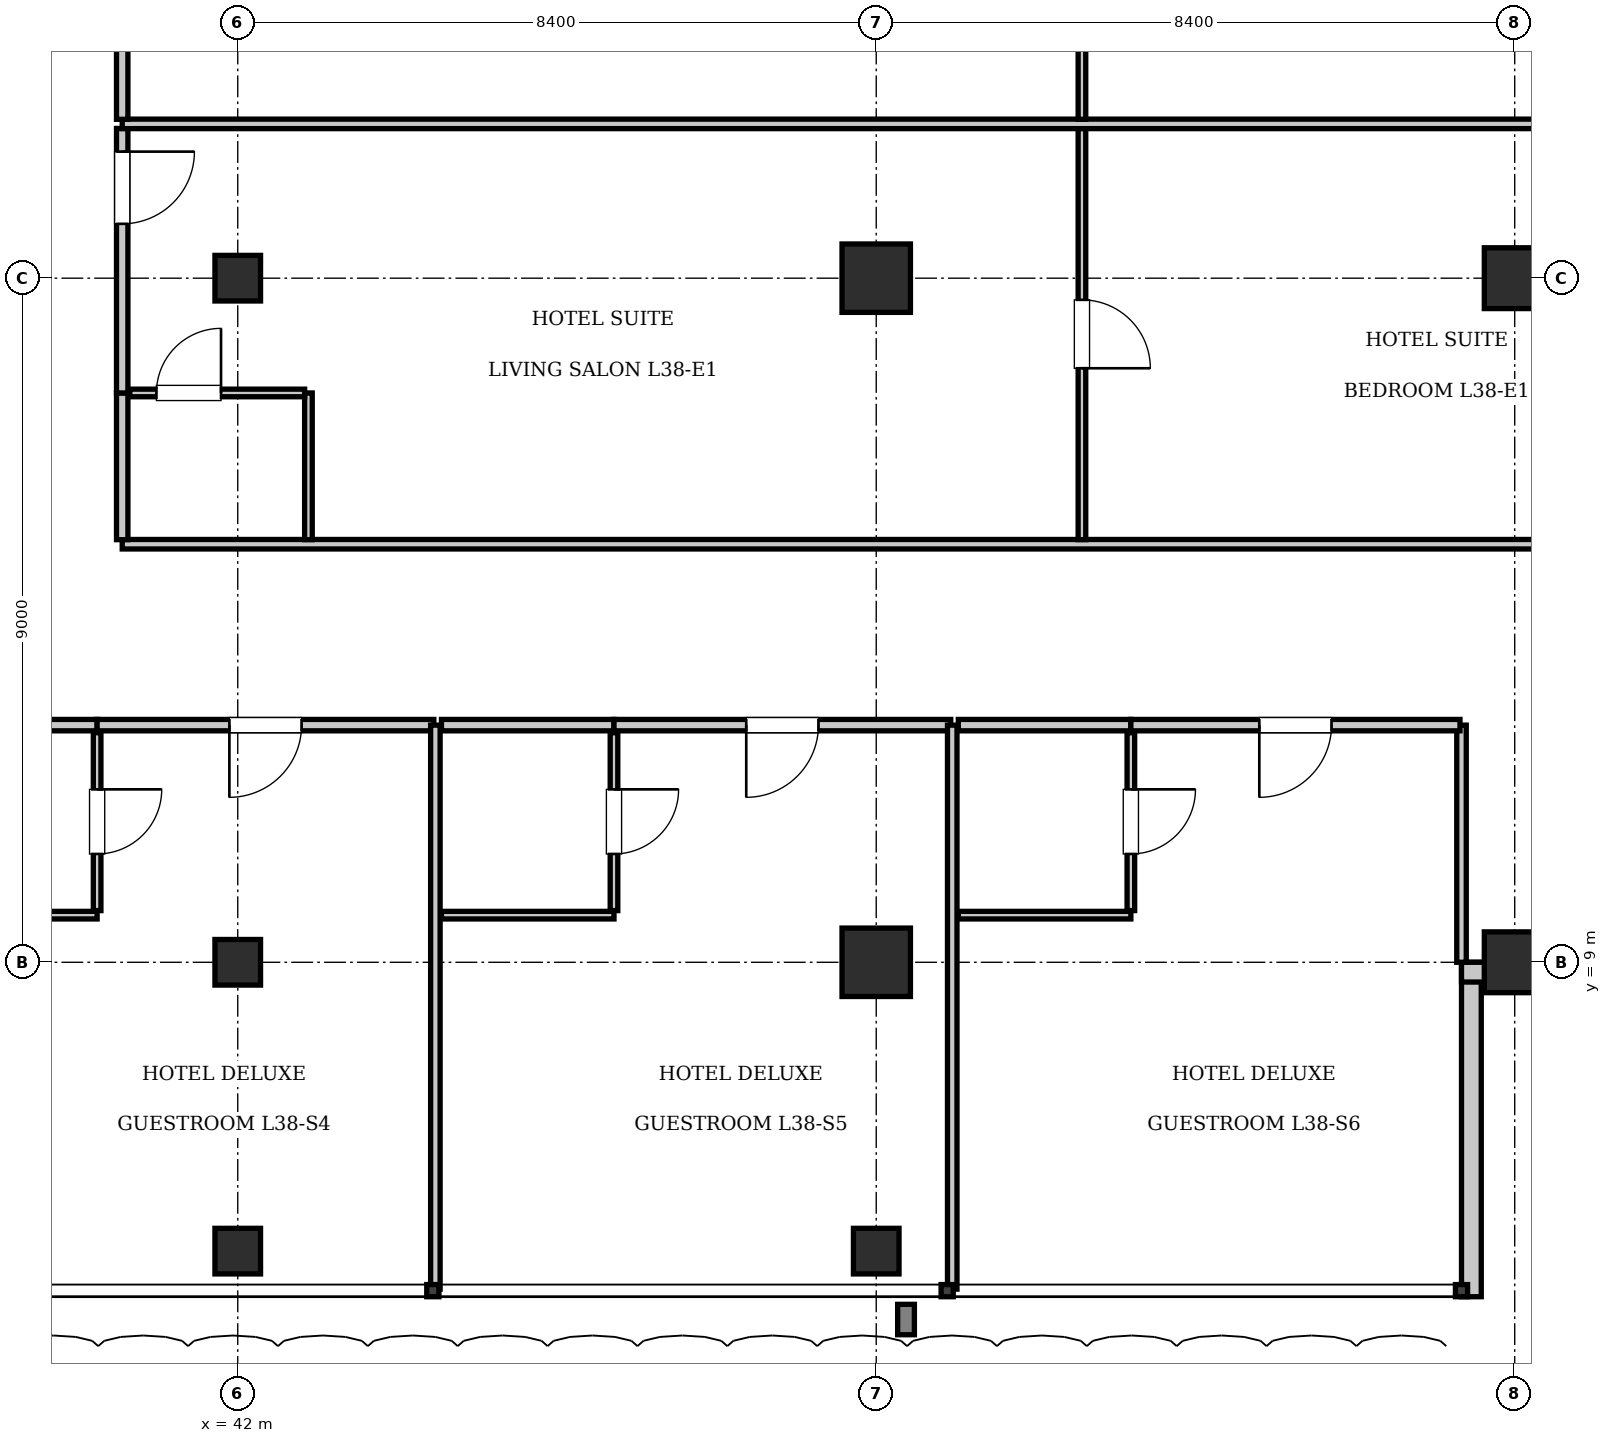
"""IFC4 building model, lengths in metres.
Left out: names, types, materials, properties, quantities, classifications, styles, units other than length and angle.
Written with IfcOpenShell. Run it as: python <this file> out.ifc"""

import sys

from ifc_helpers import new_model, si_unit, direction, frame, frame_2d, origin, origin_2d, place, context, subcontext, project, spatial, rectangle, i_section, extrude, element, fill, save


model = new_model("IFC4")
c1 = context("Model", 3, precision=1e-05, world=origin(), true_north=direction((0.0, 1.0)))
c2 = subcontext(c1, "Body", "Model", "MODEL_VIEW")
j1 = project(units=[si_unit("LENGTHUNIT", "METRE"), si_unit("PLANEANGLEUNIT", "RADIAN")], contexts=[c1])
p1 = place(None, origin())
s1 = spatial("IfcSite", under=j1, at=p1, CompositionType="ELEMENT")
p2 = place(p1, origin())
s2 = spatial("IfcBuilding", under=s1, at=p2, CompositionType="ELEMENT")
p3 = place(p2, frame((0.0, 0.0, 158.2)))
s3 = spatial("IfcBuildingStorey", under=s2, at=p3, CompositionType="ELEMENT", Elevation=158.2)
for number, where, z_axis, x_axis in (
    (1, (50.4, 18.0, 0.0), (0.0, 0.0, 1.0), (1.0, 0.0, 0.0)),
    (2, (50.4, 9.0, 0.0), (0.0, 0.0, 1.0), (1.0, 0.0, 0.0)),
):
    element("IfcColumn", number, at=place(p3, frame(where, z_axis=z_axis, x_axis=x_axis)), inside=s3, PredefinedType="COLUMN", context=c2, shape_type="SweptSolid", body=[
        extrude(rectangle(XDim=0.9, YDim=0.9, at=origin_2d()), origin(), (0.0, 0.0, 1.0), 3.85),
    ])
for number, where, z_axis, x_axis in (
    (3, (42.0, 9.0, 0.0), (0.0, 0.0, 1.0), (1.0, 0.0, 0.0)),
    (4, (42.0, 18.0, 0.0), (0.0, 0.0, 1.0), (1.0, 0.0, 0.0)),
):
    element("IfcColumn", number, at=place(p3, frame(where, z_axis=z_axis, x_axis=x_axis)), inside=s3, PredefinedType="COLUMN", context=c2, shape_type="SweptSolid", body=[
        extrude(i_section(OverallWidth=0.6, OverallDepth=0.6, WebThickness=0.025, FlangeThickness=0.038, at=origin_2d()), origin(), (0.0, 0.0, 1.0), 3.85),
    ])
for number, where, z_axis, x_axis in (
    (5, (58.8, 9.0, 0.0), (0.0, 0.0, 1.0), (1.0, 0.0, 0.0)),
    (6, (58.8, 18.0, 0.0), (0.0, 0.0, 1.0), (1.0, 0.0, 0.0)),
):
    element("IfcColumn", number, at=place(p3, frame(where, z_axis=z_axis, x_axis=x_axis)), inside=s3, PredefinedType="COLUMN", context=c2, shape_type="SweptSolid", body=[
        extrude(rectangle(XDim=0.8, YDim=0.8, at=origin_2d()), origin(), (0.0, 0.0, 1.0), 3.85),
    ])
for number, where, z_axis, x_axis in (
    (7, (42.0, 5.2, 0.0), (0.0, 0.0, 1.0), (1.0, 0.0, 0.0)),
    (8, (50.4, 5.2, 0.0), (0.0, 0.0, 1.0), (1.0, 0.0, 0.0)),
):
    element("IfcColumn", number, at=place(p3, frame(where, z_axis=z_axis, x_axis=x_axis)), inside=s3, PredefinedType="COLUMN", context=c2, shape_type="SweptSolid", body=[
        extrude(i_section(OverallWidth=0.6, OverallDepth=0.6, WebThickness=0.025, FlangeThickness=0.038, at=origin_2d()), origin(), (0.0, 0.0, 1.0), 3.85),
    ])
p4 = place(p3, frame((58.23, 9.0, 0.0), z_axis=(0.0, 0.0, 1.0), x_axis=(0.0, -1.0, 0.0)))
e9 = element("IfcWall", 9, at=p4, inside=s3, PredefinedType="SOLIDWALL", context=c2, shape_type="SweptSolid", body=[
    extrude(rectangle(XDim=4.4, YDim=0.26, at=frame_2d((2.2, 0.0))), origin(), (0.0, 0.0, 1.0), 3.61),
])
p5 = place(p3, frame((62.5, 8.87, 0.0), z_axis=(0.0, 0.0, 1.0), x_axis=(-1.0, 0.0, 0.0)))
e10 = element("IfcWall", 10, at=p5, inside=s3, PredefinedType="SOLIDWALL", context=c2, shape_type="SweptSolid", body=[
    extrude(rectangle(XDim=4.4, YDim=0.26, at=frame_2d((2.2, 0.0))), origin(), (0.0, 0.0, 1.0), 3.007),
])
p6 = place(p3, frame((58.1, 9.0, 0.0), z_axis=(0.0, 0.0, 1.0), x_axis=(0.0, 1.0, 0.0)))
e11 = element("IfcWall", 11, at=p6, inside=s3, PredefinedType="PARTITIONING", context=c2, shape_type="SweptSolid", body=[
    extrude(rectangle(XDim=3.12, YDim=0.125, at=frame_2d((1.56, 0.0))), origin(), (0.0, 0.0, 1.0), 3.61),
])
p7 = place(p3, frame((37.88, 12.12, 0.0), z_axis=(0.0, 0.0, 1.0), x_axis=(1.0, 0.0, 0.0)))
e12 = element("IfcWall", 12, at=p7, inside=s3, PredefinedType="PARTITIONING", context=c2, shape_type="SweptSolid", body=[
    extrude(rectangle(XDim=2.27, YDim=0.15, at=frame_2d((1.135, 0.0))), origin(), (0.0, 0.0, 1.0), 3.61),
])
p8 = place(p3, frame((37.88, 9.62, 0.0), z_axis=(0.0, 0.0, 1.0), x_axis=(1.0, 0.0, 0.0)))
e13 = element("IfcWall", 13, at=p8, inside=s3, PredefinedType="PARTITIONING", context=c2, shape_type="SweptSolid", body=[
    extrude(rectangle(XDim=2.27, YDim=0.1, at=frame_2d((1.135, 0.0))), origin(), (0.0, 0.0, 1.0), 3.61),
])
p9 = place(p3, frame((40.15, 9.68, 0.0), z_axis=(0.0, 0.0, 1.0), x_axis=(0.0, 1.0, 0.0)))
e14 = element("IfcWall", 14, at=p9, inside=s3, PredefinedType="PARTITIONING", context=c2, shape_type="SweptSolid", body=[
    extrude(rectangle(XDim=2.34, YDim=0.1, at=frame_2d((1.17, 0.0))), origin(), (0.0, 0.0, 1.0), 3.61),
])
p10 = place(p9, frame((0.745, 0.0, 0.0)))
e15 = element("IfcOpeningElement", 15, at=p10, cuts=e14, PredefinedType="OPENING", context=c2, shape_type="SweptSolid", body=[
    extrude(rectangle(XDim=0.85, YDim=2.1, at=frame_2d((0.425, 1.05))), frame((0.0, 0.06, 0.0), z_axis=(0.0, -1.0, 0.0), x_axis=(1.0, 0.0, 0.0)), (0.0, 0.0, 1.0), 0.12),
])
p11 = place(p3, frame((40.15, 12.12, 0.0), z_axis=(0.0, 0.0, 1.0), x_axis=(1.0, 0.0, 0.0)))
e16 = element("IfcWall", 16, at=p11, inside=s3, PredefinedType="PARTITIONING", context=c2, shape_type="SweptSolid", body=[
    extrude(rectangle(XDim=4.43, YDim=0.15, at=frame_2d((2.215, 0.0))), origin(), (0.0, 0.0, 1.0), 3.61),
])
p12 = place(p11, frame((1.74, 0.0, 0.0)))
e17 = element("IfcOpeningElement", 17, at=p12, cuts=e16, PredefinedType="OPENING", context=c2, shape_type="SweptSolid", body=[
    extrude(rectangle(XDim=0.95, YDim=2.15, at=frame_2d((0.475, 1.075))), frame((0.0, 0.085, 0.0), z_axis=(0.0, -1.0, 0.0), x_axis=(1.0, 0.0, 0.0)), (0.0, 0.0, 1.0), 0.17),
])
p13 = place(p3, frame((44.6, 4.7, 0.0), z_axis=(0.0, 0.0, 1.0), x_axis=(0.0, 1.0, 0.0)))
e18 = element("IfcWall", 18, at=p13, inside=s3, PredefinedType="PARTITIONING", context=c2, shape_type="SweptSolid", body=[
    extrude(rectangle(XDim=7.42, YDim=0.125, at=frame_2d((3.71, 0.0))), origin(), (0.0, 0.0, 1.0), 3.61),
])
p14 = place(p3, frame((44.68, 12.12, 0.0), z_axis=(0.0, 0.0, 1.0), x_axis=(1.0, 0.0, 0.0)))
e19 = element("IfcWall", 19, at=p14, inside=s3, PredefinedType="PARTITIONING", context=c2, shape_type="SweptSolid", body=[
    extrude(rectangle(XDim=2.27, YDim=0.15, at=frame_2d((1.135, 0.0))), origin(), (0.0, 0.0, 1.0), 3.61),
])
p15 = place(p3, frame((44.68, 9.62, 0.0), z_axis=(0.0, 0.0, 1.0), x_axis=(1.0, 0.0, 0.0)))
e20 = element("IfcWall", 20, at=p15, inside=s3, PredefinedType="PARTITIONING", context=c2, shape_type="SweptSolid", body=[
    extrude(rectangle(XDim=2.27, YDim=0.1, at=frame_2d((1.135, 0.0))), origin(), (0.0, 0.0, 1.0), 3.61),
])
p16 = place(p3, frame((46.95, 9.68, 0.0), z_axis=(0.0, 0.0, 1.0), x_axis=(0.0, 1.0, 0.0)))
e21 = element("IfcWall", 21, at=p16, inside=s3, PredefinedType="PARTITIONING", context=c2, shape_type="SweptSolid", body=[
    extrude(rectangle(XDim=2.34, YDim=0.1, at=frame_2d((1.17, 0.0))), origin(), (0.0, 0.0, 1.0), 3.61),
])
p17 = place(p16, frame((0.745, 0.0, 0.0)))
e22 = element("IfcOpeningElement", 22, at=p17, cuts=e21, PredefinedType="OPENING", context=c2, shape_type="SweptSolid", body=[
    extrude(rectangle(XDim=0.85, YDim=2.1, at=frame_2d((0.425, 1.05))), frame((0.0, 0.06, 0.0), z_axis=(0.0, -1.0, 0.0), x_axis=(1.0, 0.0, 0.0)), (0.0, 0.0, 1.0), 0.12),
])
p18 = place(p3, frame((46.95, 12.12, 0.0), z_axis=(0.0, 0.0, 1.0), x_axis=(1.0, 0.0, 0.0)))
e23 = element("IfcWall", 23, at=p18, inside=s3, PredefinedType="PARTITIONING", context=c2, shape_type="SweptSolid", body=[
    extrude(rectangle(XDim=4.43, YDim=0.15, at=frame_2d((2.215, 0.0))), origin(), (0.0, 0.0, 1.0), 3.61),
])
p19 = place(p18, frame((1.74, 0.0, 0.0)))
e24 = element("IfcOpeningElement", 24, at=p19, cuts=e23, PredefinedType="OPENING", context=c2, shape_type="SweptSolid", body=[
    extrude(rectangle(XDim=0.95, YDim=2.15, at=frame_2d((0.475, 1.075))), frame((0.0, 0.085, 0.0), z_axis=(0.0, -1.0, 0.0), x_axis=(1.0, 0.0, 0.0)), (0.0, 0.0, 1.0), 0.17),
])
p20 = place(p3, frame((51.4, 4.7, 0.0), z_axis=(0.0, 0.0, 1.0), x_axis=(0.0, 1.0, 0.0)))
e25 = element("IfcWall", 25, at=p20, inside=s3, PredefinedType="PARTITIONING", context=c2, shape_type="SweptSolid", body=[
    extrude(rectangle(XDim=7.42, YDim=0.125, at=frame_2d((3.71, 0.0))), origin(), (0.0, 0.0, 1.0), 3.61),
])
p21 = place(p3, frame((51.48, 12.12, 0.0), z_axis=(0.0, 0.0, 1.0), x_axis=(1.0, 0.0, 0.0)))
e26 = element("IfcWall", 26, at=p21, inside=s3, PredefinedType="PARTITIONING", context=c2, shape_type="SweptSolid", body=[
    extrude(rectangle(XDim=2.27, YDim=0.15, at=frame_2d((1.135, 0.0))), origin(), (0.0, 0.0, 1.0), 3.61),
])
p22 = place(p3, frame((51.48, 9.62, 0.0), z_axis=(0.0, 0.0, 1.0), x_axis=(1.0, 0.0, 0.0)))
e27 = element("IfcWall", 27, at=p22, inside=s3, PredefinedType="PARTITIONING", context=c2, shape_type="SweptSolid", body=[
    extrude(rectangle(XDim=2.27, YDim=0.1, at=frame_2d((1.135, 0.0))), origin(), (0.0, 0.0, 1.0), 3.61),
])
p23 = place(p3, frame((53.75, 9.68, 0.0), z_axis=(0.0, 0.0, 1.0), x_axis=(0.0, 1.0, 0.0)))
e28 = element("IfcWall", 28, at=p23, inside=s3, PredefinedType="PARTITIONING", context=c2, shape_type="SweptSolid", body=[
    extrude(rectangle(XDim=2.34, YDim=0.1, at=frame_2d((1.17, 0.0))), origin(), (0.0, 0.0, 1.0), 3.61),
])
p24 = place(p23, frame((0.745, 0.0, 0.0)))
e29 = element("IfcOpeningElement", 29, at=p24, cuts=e28, PredefinedType="OPENING", context=c2, shape_type="SweptSolid", body=[
    extrude(rectangle(XDim=0.85, YDim=2.1, at=frame_2d((0.425, 1.05))), frame((0.0, 0.06, 0.0), z_axis=(0.0, -1.0, 0.0), x_axis=(1.0, 0.0, 0.0)), (0.0, 0.0, 1.0), 0.12),
])
p25 = place(p3, frame((53.75, 12.12, 0.0), z_axis=(0.0, 0.0, 1.0), x_axis=(1.0, 0.0, 0.0)))
e30 = element("IfcWall", 30, at=p25, inside=s3, PredefinedType="PARTITIONING", context=c2, shape_type="SweptSolid", body=[
    extrude(rectangle(XDim=4.33, YDim=0.15, at=frame_2d((2.165, 0.0))), origin(), (0.0, 0.0, 1.0), 3.61),
])
p26 = place(p25, frame((1.69, 0.0, 0.0)))
e31 = element("IfcOpeningElement", 31, at=p26, cuts=e30, PredefinedType="OPENING", context=c2, shape_type="SweptSolid", body=[
    extrude(rectangle(XDim=0.95, YDim=2.15, at=frame_2d((0.475, 1.075))), frame((0.0, 0.085, 0.0), z_axis=(0.0, -1.0, 0.0), x_axis=(1.0, 0.0, 0.0)), (0.0, 0.0, 1.0), 0.17),
])
p27 = place(p3, frame((40.48, 14.5, 0.0), z_axis=(0.0, 0.0, 1.0), x_axis=(1.0, 0.0, 0.0)))
e32 = element("IfcWall", 32, at=p27, inside=s3, PredefinedType="PARTITIONING", context=c2, shape_type="SweptSolid", body=[
    extrude(rectangle(XDim=21.92, YDim=0.125, at=frame_2d((10.96, 0.0))), origin(), (0.0, 0.0, 1.0), 3.61),
])
p28 = place(p3, frame((40.48, 14.56, 0.0), z_axis=(0.0, 0.0, 1.0), x_axis=(0.0, 1.0, 0.0)))
e33 = element("IfcWall", 33, at=p28, inside=s3, PredefinedType="PARTITIONING", context=c2, shape_type="SweptSolid", body=[
    extrude(rectangle(XDim=1.93, YDim=0.15, at=frame_2d((0.965, 0.0))), origin(), (0.0, 0.0, 1.0), 3.61),
])
p29 = place(p3, frame((40.48, 16.49, 0.0), z_axis=(0.0, 0.0, 1.0), x_axis=(0.0, 1.0, 0.0)))
e34 = element("IfcWall", 34, at=p29, inside=s3, PredefinedType="PARTITIONING", context=c2, shape_type="SweptSolid", body=[
    extrude(rectangle(XDim=3.48, YDim=0.15, at=frame_2d((1.74, 0.0))), origin(), (0.0, 0.0, 1.0), 3.61),
])
p30 = place(p29, frame((2.225, 0.0, 0.0)))
e35 = element("IfcOpeningElement", 35, at=p30, cuts=e34, PredefinedType="OPENING", context=c2, shape_type="SweptSolid", body=[
    extrude(rectangle(XDim=0.95, YDim=2.15, at=frame_2d((0.475, 1.075))), frame((0.0, 0.085, 0.0), z_axis=(0.0, -1.0, 0.0), x_axis=(1.0, 0.0, 0.0)), (0.0, 0.0, 1.0), 0.17),
])
p31 = place(p3, frame((42.93, 14.56, 0.0), z_axis=(0.0, 0.0, 1.0), x_axis=(0.0, 1.0, 0.0)))
e36 = element("IfcWall", 36, at=p31, inside=s3, PredefinedType="PARTITIONING", context=c2, shape_type="SweptSolid", body=[
    extrude(rectangle(XDim=1.93, YDim=0.1, at=frame_2d((0.965, 0.0))), origin(), (0.0, 0.0, 1.0), 3.61),
])
p32 = place(p3, frame((40.58, 16.49, 0.0), z_axis=(0.0, 0.0, 1.0), x_axis=(1.0, 0.0, 0.0)))
e37 = element("IfcWall", 37, at=p32, inside=s3, PredefinedType="PARTITIONING", context=c2, shape_type="SweptSolid", body=[
    extrude(rectangle(XDim=2.3, YDim=0.1, at=frame_2d((1.15, 0.0))), origin(), (0.0, 0.0, 1.0), 3.61),
])
p33 = place(p32, frame((0.35, 0.0, 0.0)))
e38 = element("IfcOpeningElement", 38, at=p33, cuts=e37, PredefinedType="OPENING", context=c2, shape_type="SweptSolid", body=[
    extrude(rectangle(XDim=0.85, YDim=2.1, at=frame_2d((0.425, 1.05))), frame((0.0, 0.06, 0.0), z_axis=(0.0, -1.0, 0.0), x_axis=(1.0, 0.0, 0.0)), (0.0, 0.0, 1.0), 0.12),
])
p34 = place(p3, frame((53.106, 14.56, 0.0), z_axis=(0.0, 0.0, 1.0), x_axis=(0.0, 1.0, 0.0)))
e39 = element("IfcWall", 39, at=p34, inside=s3, PredefinedType="PARTITIONING", context=c2, shape_type="SweptSolid", body=[
    extrude(rectangle(XDim=5.41, YDim=0.1, at=frame_2d((2.705, 0.0))), origin(), (0.0, 0.0, 1.0), 3.61),
])
p35 = place(p34, frame((2.255, 0.0, 0.0)))
e40 = element("IfcOpeningElement", 40, at=p35, cuts=e39, PredefinedType="OPENING", context=c2, shape_type="SweptSolid", body=[
    extrude(rectangle(XDim=0.9, YDim=2.1, at=frame_2d((0.45, 1.05))), frame((0.0, 0.06, 0.0), z_axis=(0.0, -1.0, 0.0), x_axis=(1.0, 0.0, 0.0)), (0.0, 0.0, 1.0), 0.12),
])
p36 = place(p3, frame((40.48, 20.03, 0.0), z_axis=(0.0, 0.0, 1.0), x_axis=(1.0, 0.0, 0.0)))
e41 = element("IfcWall", 41, at=p36, inside=s3, PredefinedType="PARTITIONING", context=c2, shape_type="SweptSolid", body=[
    extrude(rectangle(XDim=21.92, YDim=0.125, at=frame_2d((10.96, 0.0))), origin(), (0.0, 0.0, 1.0), 3.61),
])
p37 = place(p3, frame((40.48, 20.09, 0.0), z_axis=(0.0, 0.0, 1.0), x_axis=(0.0, 1.0, 0.0)))
e42 = element("IfcWall", 42, at=p37, inside=s3, PredefinedType="PARTITIONING", context=c2, shape_type="SweptSolid", body=[
    extrude(rectangle(XDim=3.49, YDim=0.15, at=frame_2d((1.745, 0.0))), origin(), (0.0, 0.0, 1.0), 3.61),
])
p38 = place(p37, frame((1.27, 0.0, 0.0)))
e43 = element("IfcOpeningElement", 43, at=p38, cuts=e42, PredefinedType="OPENING", context=c2, shape_type="SweptSolid", body=[
    extrude(rectangle(XDim=0.95, YDim=2.15, at=frame_2d((0.475, 1.075))), frame((0.0, 0.085, 0.0), z_axis=(0.0, -1.0, 0.0), x_axis=(1.0, 0.0, 0.0)), (0.0, 0.0, 1.0), 0.17),
])
p39 = place(p3, frame((53.106, 20.09, 0.0), z_axis=(0.0, 0.0, 1.0), x_axis=(0.0, 1.0, 0.0)))
e44 = element("IfcWall", 44, at=p39, inside=s3, PredefinedType="PARTITIONING", context=c2, shape_type="SweptSolid", body=[
    extrude(rectangle(XDim=5.42, YDim=0.1, at=frame_2d((2.71, 0.0))), origin(), (0.0, 0.0, 1.0), 3.61),
])
p40 = place(p39, frame((2.26, 0.0, 0.0)))
e45 = element("IfcOpeningElement", 45, at=p40, cuts=e44, PredefinedType="OPENING", context=c2, shape_type="SweptSolid", body=[
    extrude(rectangle(XDim=0.9, YDim=2.1, at=frame_2d((0.45, 1.05))), frame((0.0, 0.06, 0.0), z_axis=(0.0, -1.0, 0.0), x_axis=(1.0, 0.0, 0.0)), (0.0, 0.0, 1.0), 0.12),
])
p41 = place(p10, frame((0.85, 0.0, 0.0), z_axis=(0.0, 0.0, 1.0), x_axis=(-1.0, 0.0, 0.0)))
e46 = element("IfcDoor", 46, at=p41, inside=s3, OperationType="SINGLE_SWING_LEFT", PredefinedType="DOOR", context=c2, shape_type="SweptSolid", body=[
    extrude(rectangle(XDim=0.85, YDim=2.1, at=frame_2d((0.425, 1.05))), frame((0.0, 0.025, 0.0), z_axis=(0.0, -1.0, 0.0), x_axis=(1.0, 0.0, 0.0)), (0.0, 0.0, 1.0), 0.05),
])
fill(e15, e46)
p42 = place(p12, frame((0.95, 0.0, 0.0), z_axis=(0.0, 0.0, 1.0), x_axis=(-1.0, 0.0, 0.0)))
e47 = element("IfcDoor", 47, at=p42, inside=s3, OperationType="SINGLE_SWING_RIGHT", PredefinedType="DOOR", context=c2, shape_type="SweptSolid", body=[
    extrude(rectangle(XDim=0.95, YDim=2.15, at=frame_2d((0.475, 1.075))), frame((0.0, 0.025, 0.0), z_axis=(0.0, -1.0, 0.0), x_axis=(1.0, 0.0, 0.0)), (0.0, 0.0, 1.0), 0.05),
])
fill(e17, e47)
p43 = place(p17, frame((0.85, 0.0, 0.0), z_axis=(0.0, 0.0, 1.0), x_axis=(-1.0, 0.0, 0.0)))
e48 = element("IfcDoor", 48, at=p43, inside=s3, OperationType="SINGLE_SWING_LEFT", PredefinedType="DOOR", context=c2, shape_type="SweptSolid", body=[
    extrude(rectangle(XDim=0.85, YDim=2.1, at=frame_2d((0.425, 1.05))), frame((0.0, 0.025, 0.0), z_axis=(0.0, -1.0, 0.0), x_axis=(1.0, 0.0, 0.0)), (0.0, 0.0, 1.0), 0.05),
])
fill(e22, e48)
p44 = place(p19, frame((0.95, 0.0, 0.0), z_axis=(0.0, 0.0, 1.0), x_axis=(-1.0, 0.0, 0.0)))
e49 = element("IfcDoor", 49, at=p44, inside=s3, OperationType="SINGLE_SWING_RIGHT", PredefinedType="DOOR", context=c2, shape_type="SweptSolid", body=[
    extrude(rectangle(XDim=0.95, YDim=2.15, at=frame_2d((0.475, 1.075))), frame((0.0, 0.025, 0.0), z_axis=(0.0, -1.0, 0.0), x_axis=(1.0, 0.0, 0.0)), (0.0, 0.0, 1.0), 0.05),
])
fill(e24, e49)
p45 = place(p24, frame((0.85, 0.0, 0.0), z_axis=(0.0, 0.0, 1.0), x_axis=(-1.0, 0.0, 0.0)))
e50 = element("IfcDoor", 50, at=p45, inside=s3, OperationType="SINGLE_SWING_LEFT", PredefinedType="DOOR", context=c2, shape_type="SweptSolid", body=[
    extrude(rectangle(XDim=0.85, YDim=2.1, at=frame_2d((0.425, 1.05))), frame((0.0, 0.025, 0.0), z_axis=(0.0, -1.0, 0.0), x_axis=(1.0, 0.0, 0.0)), (0.0, 0.0, 1.0), 0.05),
])
fill(e29, e50)
p46 = place(p26, frame((0.95, 0.0, 0.0), z_axis=(0.0, 0.0, 1.0), x_axis=(-1.0, 0.0, 0.0)))
e51 = element("IfcDoor", 51, at=p46, inside=s3, OperationType="SINGLE_SWING_RIGHT", PredefinedType="DOOR", context=c2, shape_type="SweptSolid", body=[
    extrude(rectangle(XDim=0.95, YDim=2.15, at=frame_2d((0.475, 1.075))), frame((0.0, 0.025, 0.0), z_axis=(0.0, -1.0, 0.0), x_axis=(1.0, 0.0, 0.0)), (0.0, 0.0, 1.0), 0.05),
])
fill(e31, e51)
p47 = place(p33, origin())
e52 = element("IfcDoor", 52, at=p47, inside=s3, OperationType="SINGLE_SWING_RIGHT", PredefinedType="DOOR", context=c2, shape_type="SweptSolid", body=[
    extrude(rectangle(XDim=0.85, YDim=2.1, at=frame_2d((0.425, 1.05))), frame((0.0, 0.025, 0.0), z_axis=(0.0, -1.0, 0.0), x_axis=(1.0, 0.0, 0.0)), (0.0, 0.0, 1.0), 0.05),
])
fill(e38, e52)
p48 = place(p30, frame((0.95, 0.0, 0.0), z_axis=(0.0, 0.0, 1.0), x_axis=(-1.0, 0.0, 0.0)))
e53 = element("IfcDoor", 53, at=p48, inside=s3, OperationType="SINGLE_SWING_LEFT", PredefinedType="DOOR", context=c2, shape_type="SweptSolid", body=[
    extrude(rectangle(XDim=0.95, YDim=2.15, at=frame_2d((0.475, 1.075))), frame((0.0, 0.025, 0.0), z_axis=(0.0, -1.0, 0.0), x_axis=(1.0, 0.0, 0.0)), (0.0, 0.0, 1.0), 0.05),
])
fill(e35, e53)
p49 = place(p35, frame((0.9, 0.0, 0.0), z_axis=(0.0, 0.0, 1.0), x_axis=(-1.0, 0.0, 0.0)))
e54 = element("IfcDoor", 54, at=p49, inside=s3, OperationType="SINGLE_SWING_RIGHT", PredefinedType="DOOR", context=c2, shape_type="SweptSolid", body=[
    extrude(rectangle(XDim=0.9, YDim=2.1, at=frame_2d((0.45, 1.05))), frame((0.0, 0.025, 0.0), z_axis=(0.0, -1.0, 0.0), x_axis=(1.0, 0.0, 0.0)), (0.0, 0.0, 1.0), 0.05),
])
fill(e40, e54)
save(model, sys.argv[1])
